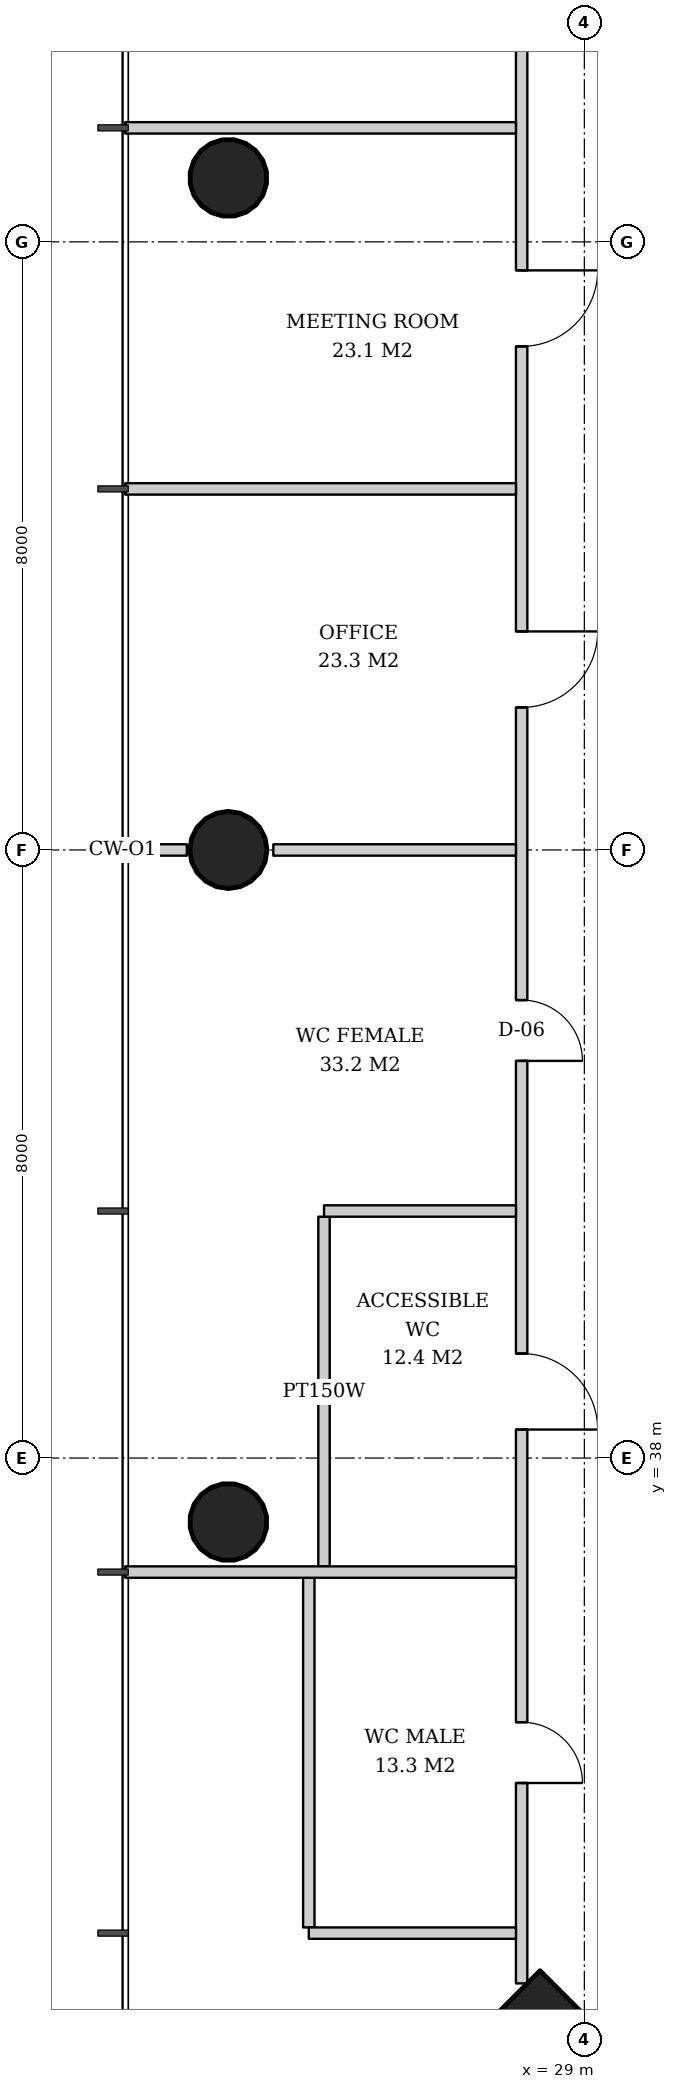
"""IFC4 building model, lengths in metres.
Left out: names, types, materials, properties, quantities, classifications, styles, units other than length and angle.
Written with IfcOpenShell. Run it as: python <this file> out.ifc"""

import sys

from ifc_helpers import new_model, si_unit, direction, frame, frame_2d, origin, origin_2d, place, context, subcontext, project, spatial, rectangle, hollow_circle, extrude, element, fill, save


model = new_model("IFC4")
c1 = context("Model", 3, precision=1e-05, world=origin(), true_north=direction((0.0, 1.0)))
c2 = subcontext(c1, "Body", "Model", "MODEL_VIEW")
j1 = project(units=[si_unit("LENGTHUNIT", "METRE"), si_unit("PLANEANGLEUNIT", "RADIAN")], contexts=[c1])
p1 = place(None, origin())
s1 = spatial("IfcSite", under=j1, at=p1, CompositionType="ELEMENT")
p2 = place(p1, origin())
s2 = spatial("IfcBuilding", under=s1, at=p2, CompositionType="ELEMENT")
p3 = place(p2, frame((0.0, 0.0, 123.6)))
s3 = spatial("IfcBuildingStorey", under=s2, at=p3, CompositionType="ELEMENT", Elevation=123.6)
p4 = place(p3, frame((28.379, 29.379, 0.0), z_axis=(0.031900153262, 0.031900153262, 0.998981861919), x_axis=(-0.707106781187, 0.707106781187, 0.0)))
e1 = element("IfcColumn", 1, at=p4, inside=s3, PredefinedType="COLUMN", context=c2, shape_type="SweptSolid", body=[
    extrude(rectangle(XDim=2.6, YDim=2.6, at=origin_2d()), origin(), (0.0, 0.0, 1.0), 3.804),
])
p5 = place(p3, frame((24.279, 54.861, 0.0), z_axis=(0.031912349901, -0.015924069971, 0.999363810591), x_axis=(0.446493300058, 0.894786976326, 0.0)))
e2 = element("IfcColumn", 2, at=p5, inside=s3, PredefinedType="COLUMN", context=c2, shape_type="SweptSolid", body=[
    extrude(hollow_circle(Radius=0.508, WallThickness=0.04, at=origin_2d()), origin(), (0.0, 0.0, 1.0), 3.802),
])
p6 = place(p3, frame((24.279, 46.0, 0.0), z_axis=(0.031916396774, 0.0, 0.999490542035), x_axis=(0.0, 1.0, 0.0)))
e3 = element("IfcColumn", 3, at=p6, inside=s3, PredefinedType="COLUMN", context=c2, shape_type="SweptSolid", body=[
    extrude(hollow_circle(Radius=0.508, WallThickness=0.04, at=origin_2d()), origin(), (0.0, 0.0, 1.0), 3.802),
])
p7 = place(p3, frame((24.279, 37.139, 0.0), z_axis=(0.031912349901, 0.015924069971, 0.999363810591), x_axis=(-0.446493300058, 0.894786976326, 0.0)))
e4 = element("IfcColumn", 4, at=p7, inside=s3, PredefinedType="COLUMN", context=c2, shape_type="SweptSolid", body=[
    extrude(hollow_circle(Radius=0.508, WallThickness=0.04, at=origin_2d()), origin(), (0.0, 0.0, 1.0), 3.802),
])
for number, where, z_axis, x_axis in (
    (5, (25.575, 41.175, 0.0), (0.0, 0.0, 1.0), (0.0, -1.0, 0.0)),
    (6, (25.375, 36.425, 0.0), (0.0, 0.0, 1.0), (0.0, -1.0, 0.0)),
):
    element("IfcWall", number, at=place(p3, frame(where, z_axis=z_axis, x_axis=x_axis)), inside=s3, PredefinedType="PARTITIONING", context=c2, shape_type="SweptSolid", body=[
        extrude(rectangle(XDim=4.6, YDim=0.15, at=frame_2d((2.3, 0.0))), origin(), (0.0, 0.0, 1.0), 2.806),
    ])
p8 = place(p3, frame((28.175, 60.912, 0.0), z_axis=(0.0, 0.0, 1.0), x_axis=(0.0, -1.0, 0.0)))
e7 = element("IfcWall", 7, at=p8, inside=s3, PredefinedType="PARTITIONING", context=c2, shape_type="SweptSolid", body=[
    extrude(rectangle(XDim=29.823, YDim=0.15, at=frame_2d((14.912, 0.0))), origin(), (0.0, 0.0, 1.0), 2.72),
])
p9 = place(p8, frame((2.537, 0.0, 0.0)))
e8 = element("IfcOpeningElement", 8, at=p9, cuts=e7, PredefinedType="OPENING", context=c2, shape_type="SweptSolid", body=[
    extrude(rectangle(XDim=1.0, YDim=2.1, at=frame_2d((0.5, 1.05))), frame((0.0, 0.085, 0.0), z_axis=(0.0, -1.0, 0.0), x_axis=(1.0, 0.0, 0.0)), (0.0, 0.0, 1.0), 0.17),
])
p10 = place(p8, frame((7.287, 0.0, 0.0)))
e9 = element("IfcOpeningElement", 9, at=p10, cuts=e7, PredefinedType="OPENING", context=c2, shape_type="SweptSolid", body=[
    extrude(rectangle(XDim=1.0, YDim=2.1, at=frame_2d((0.5, 1.05))), frame((0.0, 0.085, 0.0), z_axis=(0.0, -1.0, 0.0), x_axis=(1.0, 0.0, 0.0)), (0.0, 0.0, 1.0), 0.17),
])
p11 = place(p8, frame((12.037, 0.0, 0.0)))
e10 = element("IfcOpeningElement", 10, at=p11, cuts=e7, PredefinedType="OPENING", context=c2, shape_type="SweptSolid", body=[
    extrude(rectangle(XDim=1.0, YDim=2.1, at=frame_2d((0.5, 1.05))), frame((0.0, 0.085, 0.0), z_axis=(0.0, -1.0, 0.0), x_axis=(1.0, 0.0, 0.0)), (0.0, 0.0, 1.0), 0.17),
])
p12 = place(p8, frame((16.886, 0.0, 0.0)))
e11 = element("IfcOpeningElement", 11, at=p12, cuts=e7, PredefinedType="OPENING", context=c2, shape_type="SweptSolid", body=[
    extrude(rectangle(XDim=0.8, YDim=2.1, at=frame_2d((0.4, 1.05))), frame((0.0, 0.085, 0.0), z_axis=(0.0, -1.0, 0.0), x_axis=(1.0, 0.0, 0.0)), (0.0, 0.0, 1.0), 0.17),
])
p13 = place(p8, frame((21.537, 0.0, 0.0)))
e12 = element("IfcOpeningElement", 12, at=p13, cuts=e7, PredefinedType="OPENING", context=c2, shape_type="SweptSolid", body=[
    extrude(rectangle(XDim=1.0, YDim=2.1, at=frame_2d((0.5, 1.05))), frame((0.0, 0.085, 0.0), z_axis=(0.0, -1.0, 0.0), x_axis=(1.0, 0.0, 0.0)), (0.0, 0.0, 1.0), 0.17),
])
p14 = place(p8, frame((26.386, 0.0, 0.0)))
e13 = element("IfcOpeningElement", 13, at=p14, cuts=e7, PredefinedType="OPENING", context=c2, shape_type="SweptSolid", body=[
    extrude(rectangle(XDim=0.8, YDim=2.1, at=frame_2d((0.4, 1.05))), frame((0.0, 0.085, 0.0), z_axis=(0.0, -1.0, 0.0), x_axis=(1.0, 0.0, 0.0)), (0.0, 0.0, 1.0), 0.17),
])
for number, where, z_axis, x_axis in (
    (14, (28.1, 55.5, 0.0), (0.0, 0.0, 1.0), (-1.0, 0.0, 0.0)),
    (15, (28.1, 50.75, 0.0), (0.0, 0.0, 1.0), (-1.0, 0.0, 0.0)),
):
    element("IfcWall", number, at=place(p3, frame(where, z_axis=z_axis, x_axis=x_axis)), inside=s3, PredefinedType="PARTITIONING", context=c2, shape_type="SweptSolid", body=[
        extrude(rectangle(XDim=5.14, YDim=0.15, at=frame_2d((2.57, 0.0))), origin(), (0.0, 0.0, 1.0), 2.82),
    ])
p15 = place(p3, frame((28.1, 46.0, 0.0), z_axis=(0.0, 0.0, 1.0), x_axis=(-1.0, 0.0, 0.0)))
e16 = element("IfcWall", 16, at=p15, inside=s3, PredefinedType="PARTITIONING", context=c2, shape_type="SweptSolid", body=[
    extrude(rectangle(XDim=3.192, YDim=0.15, at=frame_2d((1.596, 0.0))), origin(), (0.0, 0.0, 1.0), 3.62),
])
p16 = place(p3, frame((23.771, 46.0, 0.0), z_axis=(0.0, 0.0, 1.0), x_axis=(-1.0, 0.0, 0.0)))
e17 = element("IfcWall", 17, at=p16, inside=s3, PredefinedType="PARTITIONING", context=c2, shape_type="SweptSolid", body=[
    extrude(rectangle(XDim=0.811, YDim=0.15, at=frame_2d((0.405, 0.0))), origin(), (0.0, 0.0, 1.0), 3.62),
])
p17 = place(p3, frame((28.1, 41.25, 0.0), z_axis=(0.0, 0.0, 1.0), x_axis=(-1.0, 0.0, 0.0)))
e18 = element("IfcWall", 18, at=p17, inside=s3, PredefinedType="PARTITIONING", context=c2, shape_type="SweptSolid", body=[
    extrude(rectangle(XDim=2.525, YDim=0.15, at=frame_2d((1.263, 0.0))), origin(), (0.0, 0.0, 1.0), 3.62),
])
p18 = place(p3, frame((28.1, 36.5, 0.0), z_axis=(0.0, 0.0, 1.0), x_axis=(-1.0, 0.0, 0.0)))
e19 = element("IfcWall", 19, at=p18, inside=s3, PredefinedType="PARTITIONING", context=c2, shape_type="SweptSolid", body=[
    extrude(rectangle(XDim=5.14, YDim=0.15, at=frame_2d((2.57, 0.0))), origin(), (0.0, 0.0, 1.0), 2.82),
])
p19 = place(p3, frame((28.1, 31.75, 0.0), z_axis=(0.0, 0.0, 1.0), x_axis=(-1.0, 0.0, 0.0)))
e20 = element("IfcWall", 20, at=p19, inside=s3, PredefinedType="PARTITIONING", context=c2, shape_type="SweptSolid", body=[
    extrude(rectangle(XDim=2.725, YDim=0.15, at=frame_2d((1.363, 0.0))), origin(), (0.0, 0.0, 1.0), 3.62),
])
p20 = place(p10, origin())
e21 = element("IfcDoor", 21, at=p20, inside=s3, OperationType="SINGLE_SWING_LEFT", PredefinedType="DOOR", context=c2, shape_type="SweptSolid", body=[
    extrude(rectangle(XDim=1.0, YDim=2.1, at=frame_2d((0.5, 1.05))), frame((0.0, 0.025, 0.0), z_axis=(0.0, -1.0, 0.0), x_axis=(1.0, 0.0, 0.0)), (0.0, 0.0, 1.0), 0.05),
])
fill(e9, e21)
p21 = place(p11, origin())
e22 = element("IfcDoor", 22, at=p21, inside=s3, OperationType="SINGLE_SWING_LEFT", PredefinedType="DOOR", context=c2, shape_type="SweptSolid", body=[
    extrude(rectangle(XDim=1.0, YDim=2.1, at=frame_2d((0.5, 1.05))), frame((0.0, 0.025, 0.0), z_axis=(0.0, -1.0, 0.0), x_axis=(1.0, 0.0, 0.0)), (0.0, 0.0, 1.0), 0.05),
])
fill(e10, e22)
p22 = place(p12, origin())
e23 = element("IfcDoor", 23, at=p22, inside=s3, OperationType="SINGLE_SWING_RIGHT", PredefinedType="DOOR", context=c2, shape_type="SweptSolid", body=[
    extrude(rectangle(XDim=0.8, YDim=2.1, at=frame_2d((0.4, 1.05))), frame((0.0, 0.025, 0.0), z_axis=(0.0, -1.0, 0.0), x_axis=(1.0, 0.0, 0.0)), (0.0, 0.0, 1.0), 0.05),
])
fill(e11, e23)
p23 = place(p13, origin())
e24 = element("IfcDoor", 24, at=p23, inside=s3, OperationType="SINGLE_SWING_RIGHT", PredefinedType="DOOR", context=c2, shape_type="SweptSolid", body=[
    extrude(rectangle(XDim=1.0, YDim=2.1, at=frame_2d((0.5, 1.05))), frame((0.0, 0.025, 0.0), z_axis=(0.0, -1.0, 0.0), x_axis=(1.0, 0.0, 0.0)), (0.0, 0.0, 1.0), 0.05),
])
fill(e12, e24)
p24 = place(p14, origin())
e25 = element("IfcDoor", 25, at=p24, inside=s3, OperationType="SINGLE_SWING_RIGHT", PredefinedType="DOOR", context=c2, shape_type="SweptSolid", body=[
    extrude(rectangle(XDim=0.8, YDim=2.1, at=frame_2d((0.4, 1.05))), frame((0.0, 0.025, 0.0), z_axis=(0.0, -1.0, 0.0), x_axis=(1.0, 0.0, 0.0)), (0.0, 0.0, 1.0), 0.05),
])
fill(e13, e25)
save(model, sys.argv[1])
